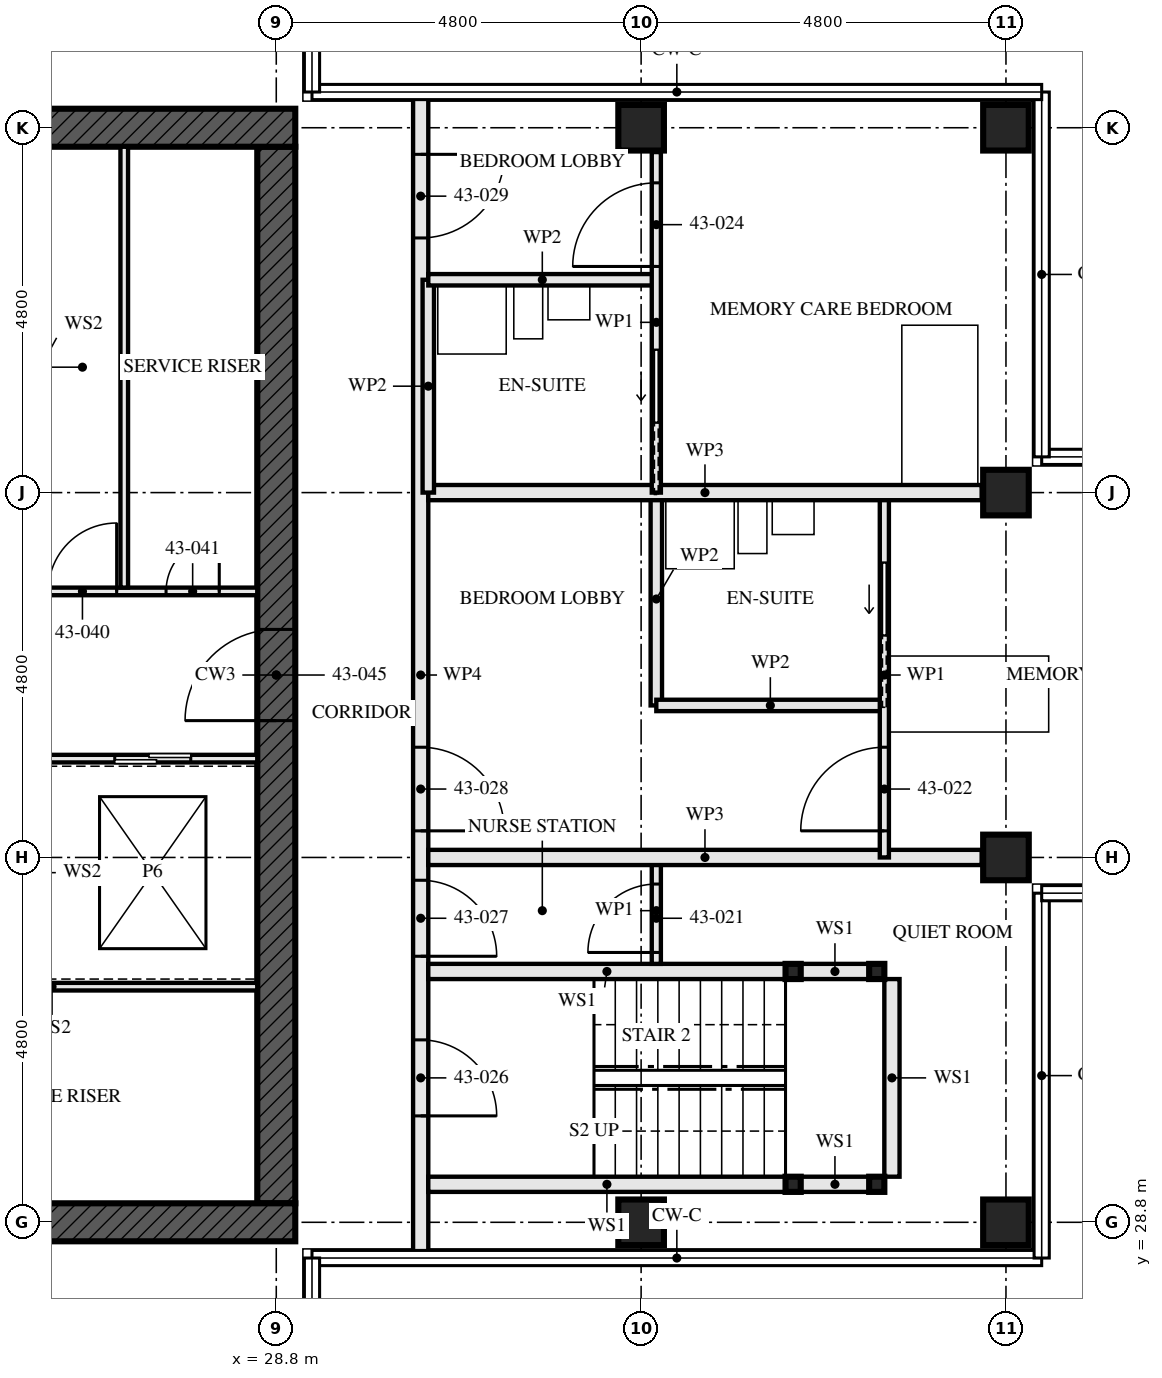
"""IFC4 building model, lengths in metres.
Left out: names, types, materials, properties, quantities, classifications, styles, units other than length and angle.
Written with IfcOpenShell. Run it as: python <this file> out.ifc"""

import sys

from ifc_helpers import new_model, si_unit, direction, frame, frame_2d, origin, origin_2d, place, context, subcontext, project, spatial, rectangle, hollow_rectangle, extrude, element, fill, save


model = new_model("IFC4")
c1 = context("Model", 3, precision=1e-05, world=origin(), true_north=direction((0.0, 1.0)))
c2 = subcontext(c1, "Body", "Model", "MODEL_VIEW")
j1 = project(units=[si_unit("LENGTHUNIT", "METRE"), si_unit("PLANEANGLEUNIT", "RADIAN")], contexts=[c1])
p1 = place(None, origin())
s1 = spatial("IfcSite", under=j1, at=p1, CompositionType="ELEMENT")
p2 = place(p1, origin())
s2 = spatial("IfcBuilding", under=s1, at=p2, CompositionType="ELEMENT")
p3 = place(p2, frame((0.0, 0.0, 158.5)))
s3 = spatial("IfcBuildingStorey", under=s2, at=p3, CompositionType="ELEMENT", Elevation=158.5)
for number, where, z_axis, x_axis in (
    (1, (33.6, 28.8, 0.0), (0.0, 0.0, 1.0), (0.0, 1.0, 0.0)),
    (2, (33.6, 43.2, 0.0), (0.0, 0.0, 1.0), (0.0, 1.0, 0.0)),
):
    element("IfcColumn", number, at=place(p3, frame(where, z_axis=z_axis, x_axis=x_axis)), inside=s3, PredefinedType="COLUMN", context=c2, shape_type="SweptSolid", body=[
        extrude(hollow_rectangle(XDim=0.6, YDim=0.6, WallThickness=0.08, at=origin_2d()), origin(), (0.0, 0.0, 1.0), 3.5),
    ])
for number, where, z_axis, x_axis in (
    (3, (38.4, 28.8, 0.0), (0.0, 0.0, 1.0), (0.0, 1.0, 0.0)),
    (4, (38.4, 33.6, 0.0), (0.0, 0.0, 1.0), (0.0, 1.0, 0.0)),
    (5, (38.4, 38.4, 0.0), (0.0, 0.0, 1.0), (0.0, 1.0, 0.0)),
    (6, (38.4, 43.2, 0.0), (0.0, 0.0, 1.0), (0.0, 1.0, 0.0)),
):
    element("IfcColumn", number, at=place(p3, frame(where, z_axis=z_axis, x_axis=x_axis)), inside=s3, PredefinedType="COLUMN", context=c2, shape_type="SweptSolid", body=[
        extrude(hollow_rectangle(XDim=0.6, YDim=0.6, WallThickness=0.06, at=origin_2d()), origin(), (0.0, 0.0, 1.0), 3.5),
    ])
p4 = place(p3, frame((14.15, 28.8, -0.17), z_axis=(0.0, 0.0, 1.0), x_axis=(1.0, 0.0, 0.0)))
e7 = element("IfcWall", 7, at=p4, inside=s3, PredefinedType="SHEAR", context=c2, shape_type="SweptSolid", body=[
    extrude(rectangle(XDim=14.9, YDim=0.5, at=frame_2d((7.45, 0.0))), origin(), (0.0, 0.0, 1.0), 3.5),
])
p5 = place(p4, frame((6.85, 0.0, 0.17)))
e8 = element("IfcOpeningElement", 8, at=p5, cuts=e7, PredefinedType="OPENING", context=c2, shape_type="SweptSolid", body=[
    extrude(rectangle(XDim=1.2, YDim=2.1, at=frame_2d((0.6, 1.05))), frame((0.0, 0.26, 0.0), z_axis=(0.0, -1.0, 0.0), x_axis=(1.0, 0.0, 0.0)), (0.0, 0.0, 1.0), 0.521),
])
p6 = place(p3, frame((29.05, 43.2, -0.17), z_axis=(0.0, 0.0, 1.0), x_axis=(-1.0, 0.0, 0.0)))
e9 = element("IfcWall", 9, at=p6, inside=s3, PredefinedType="SHEAR", context=c2, shape_type="SweptSolid", body=[
    extrude(rectangle(XDim=14.9, YDim=0.5, at=frame_2d((7.45, 0.0))), origin(), (0.0, 0.0, 1.0), 3.5),
])
p7 = place(p6, frame((6.85, 0.0, 0.17)))
e10 = element("IfcOpeningElement", 10, at=p7, cuts=e9, PredefinedType="OPENING", context=c2, shape_type="SweptSolid", body=[
    extrude(rectangle(XDim=1.2, YDim=2.1, at=frame_2d((0.6, 1.05))), frame((0.0, 0.26, 0.0), z_axis=(0.0, -1.0, 0.0), x_axis=(1.0, 0.0, 0.0)), (0.0, 0.0, 1.0), 0.521),
])
p8 = place(p3, frame((28.8, 29.05, -0.17), z_axis=(0.0, 0.0, 1.0), x_axis=(0.0, 1.0, 0.0)))
e11 = element("IfcWall", 11, at=p8, inside=s3, PredefinedType="SHEAR", context=c2, shape_type="SweptSolid", body=[
    extrude(rectangle(XDim=13.9, YDim=0.5, at=frame_2d((6.95, 0.0))), origin(), (0.0, 0.0, 1.0), 3.5),
])
p9 = place(p8, frame((6.35, 0.0, 0.17)))
e12 = element("IfcOpeningElement", 12, at=p9, cuts=e11, PredefinedType="OPENING", context=c2, shape_type="SweptSolid", body=[
    extrude(rectangle(XDim=1.2, YDim=2.1, at=frame_2d((0.6, 1.05))), frame((0.0, 0.26, 0.0), z_axis=(0.0, -1.0, 0.0), x_axis=(1.0, 0.0, 0.0)), (0.0, 0.0, 1.0), 0.521),
])
for number, where, z_axis, x_axis in (
    (13, (36.7, 29.3, 0.0), (0.0, 0.0, 1.0), (1.0, 0.0, 0.0)),
    (14, (36.7, 32.1, 0.0), (0.0, 0.0, 1.0), (1.0, 0.0, 0.0)),
    (15, (35.6, 29.3, 0.0), (0.0, 0.0, 1.0), (1.0, 0.0, 0.0)),
    (16, (35.6, 32.1, 0.0), (0.0, 0.0, 1.0), (1.0, 0.0, 0.0)),
):
    element("IfcColumn", number, at=place(p3, frame(where, z_axis=z_axis, x_axis=x_axis)), inside=s3, PredefinedType="COLUMN", context=c2, shape_type="SweptSolid", body=[
        extrude(hollow_rectangle(XDim=0.2, YDim=0.2, WallThickness=0.008, at=origin_2d()), origin(), (0.0, 0.0, 1.0), 3.33),
    ])
p10 = place(p3, frame((36.6, 29.3, 0.0), z_axis=(0.0, 0.0, 1.0), x_axis=(-1.0, 0.0, 0.0)))
e17 = element("IfcWall", 17, at=p10, inside=s3, PredefinedType="SOLIDWALL", context=c2, shape_type="SweptSolid", body=[
    extrude(rectangle(XDim=0.9, YDim=0.2, at=frame_2d((0.45, 0.0))), origin(), (0.0, 0.0, 1.0), 2.99),
])
p11 = place(p3, frame((35.5, 29.3, 0.0), z_axis=(0.0, 0.0, 1.0), x_axis=(-1.0, 0.0, 0.0)))
e18 = element("IfcWall", 18, at=p11, inside=s3, PredefinedType="SOLIDWALL", context=c2, shape_type="SweptSolid", body=[
    extrude(rectangle(XDim=4.7, YDim=0.2, at=frame_2d((2.35, 0.0))), origin(), (0.0, 0.0, 1.0), 2.99),
])
p12 = place(p3, frame((36.6, 32.1, 0.0), z_axis=(0.0, 0.0, 1.0), x_axis=(-1.0, 0.0, 0.0)))
e19 = element("IfcWall", 19, at=p12, inside=s3, PredefinedType="SOLIDWALL", context=c2, shape_type="SweptSolid", body=[
    extrude(rectangle(XDim=0.9, YDim=0.2, at=frame_2d((0.45, 0.0))), origin(), (0.0, 0.0, 1.0), 2.99),
])
p13 = place(p3, frame((35.5, 32.1, 0.0), z_axis=(0.0, 0.0, 1.0), x_axis=(-1.0, 0.0, 0.0)))
e20 = element("IfcWall", 20, at=p13, inside=s3, PredefinedType="SOLIDWALL", context=c2, shape_type="SweptSolid", body=[
    extrude(rectangle(XDim=4.7, YDim=0.2, at=frame_2d((2.35, 0.0))), origin(), (0.0, 0.0, 1.0), 2.99),
])
p14 = place(p3, frame((36.9, 29.4, 0.0), z_axis=(0.0, 0.0, 1.0), x_axis=(0.0, 1.0, 0.0)))
e21 = element("IfcWall", 21, at=p14, inside=s3, PredefinedType="SOLIDWALL", context=c2, shape_type="SweptSolid", body=[
    extrude(rectangle(XDim=2.6, YDim=0.2, at=frame_2d((1.3, 0.0))), origin(), (0.0, 0.0, 1.0), 3.33),
])
p15 = place(p3, frame((33.8, 32.2, 0.0), z_axis=(0.0, 0.0, 1.0), x_axis=(0.0, 1.0, 0.0)))
e22 = element("IfcWall", 22, at=p15, inside=s3, PredefinedType="PARTITIONING", context=c2, shape_type="SweptSolid", body=[
    extrude(rectangle(XDim=1.4, YDim=0.12, at=frame_2d((0.7, 0.0))), origin(), (0.0, 0.0, 1.0), 3.33),
])
p16 = place(p15, frame((0.15, 0.0, 0.0)))
e23 = element("IfcOpeningElement", 23, at=p16, cuts=e22, PredefinedType="OPENING", context=c2, shape_type="SweptSolid", body=[
    extrude(rectangle(XDim=0.9, YDim=2.1, at=frame_2d((0.45, 1.05))), frame((0.0, 0.071, 0.0), z_axis=(0.0, -1.0, 0.0), x_axis=(1.0, 0.0, 0.0)), (0.0, 0.0, 1.0), 0.141),
])
p17 = place(p3, frame((38.08, 33.6, 0.0), z_axis=(0.0, 0.0, 1.0), x_axis=(-1.0, 0.0, 0.0)))
e24 = element("IfcWall", 24, at=p17, inside=s3, PredefinedType="PARTITIONING", context=c2, shape_type="SweptSolid", body=[
    extrude(rectangle(XDim=7.28, YDim=0.2, at=frame_2d((3.64, 0.0))), origin(), (0.0, 0.0, 1.0), 2.55),
])
p18 = place(p3, frame((36.8, 35.6, 0.0), z_axis=(0.0, 0.0, 1.0), x_axis=(-1.0, 0.0, 0.0)))
e25 = element("IfcWall", 25, at=p18, inside=s3, PredefinedType="PARTITIONING", context=c2, shape_type="SweptSolid", body=[
    extrude(rectangle(XDim=3.0, YDim=0.15, at=frame_2d((1.5, 0.0))), origin(), (0.0, 0.0, 1.0), 3.33),
])
p19 = place(p3, frame((33.8, 35.6, 0.0), z_axis=(0.0, 0.0, 1.0), x_axis=(0.0, 1.0, 0.0)))
e26 = element("IfcWall", 26, at=p19, inside=s3, PredefinedType="PARTITIONING", context=c2, shape_type="SweptSolid", body=[
    extrude(rectangle(XDim=2.8, YDim=0.15, at=frame_2d((1.4, 0.0))), origin(), (0.0, 0.0, 1.0), 3.33),
])
p20 = place(p3, frame((36.8, 33.6, 0.0), z_axis=(0.0, 0.0, 1.0), x_axis=(0.0, 1.0, 0.0)))
e27 = element("IfcWall", 27, at=p20, inside=s3, PredefinedType="PARTITIONING", context=c2, shape_type="SweptSolid", body=[
    extrude(rectangle(XDim=4.8, YDim=0.12, at=frame_2d((2.4, 0.0))), origin(), (0.0, 0.0, 1.0), 3.33),
])
p21 = place(p20, frame((0.35, 0.0, 0.0)))
e28 = element("IfcOpeningElement", 28, at=p21, cuts=e27, PredefinedType="OPENING", context=c2, shape_type="SweptSolid", body=[
    extrude(rectangle(XDim=1.1, YDim=2.1, at=frame_2d((0.55, 1.05))), frame((0.0, 0.071, 0.0), z_axis=(0.0, -1.0, 0.0), x_axis=(1.0, 0.0, 0.0)), (0.0, 0.0, 1.0), 0.141),
])
p22 = place(p20, frame((2.925, 0.0, 0.0)))
e29 = element("IfcOpeningElement", 29, at=p22, cuts=e27, PredefinedType="OPENING", context=c2, shape_type="SweptSolid", body=[
    extrude(rectangle(XDim=0.95, YDim=2.1, at=frame_2d((0.475, 1.05))), frame((0.0, 0.071, 0.0), z_axis=(0.0, -1.0, 0.0), x_axis=(1.0, 0.0, 0.0)), (0.0, 0.0, 1.0), 0.141),
])
p23 = place(p3, frame((38.08, 38.4, 0.0), z_axis=(0.0, 0.0, 1.0), x_axis=(-1.0, 0.0, 0.0)))
e30 = element("IfcWall", 30, at=p23, inside=s3, PredefinedType="PARTITIONING", context=c2, shape_type="SweptSolid", body=[
    extrude(rectangle(XDim=7.28, YDim=0.2, at=frame_2d((3.64, 0.0))), origin(), (0.0, 0.0, 1.0), 2.55),
])
p24 = place(p3, frame((33.8, 41.2, 0.0), z_axis=(0.0, 0.0, 1.0), x_axis=(-1.0, 0.0, 0.0)))
e31 = element("IfcWall", 31, at=p24, inside=s3, PredefinedType="PARTITIONING", context=c2, shape_type="SweptSolid", body=[
    extrude(rectangle(XDim=3.0, YDim=0.15, at=frame_2d((1.5, 0.0))), origin(), (0.0, 0.0, 1.0), 3.33),
])
p25 = place(p3, frame((30.8, 38.4, 0.0), z_axis=(0.0, 0.0, 1.0), x_axis=(0.0, 1.0, 0.0)))
e32 = element("IfcWall", 32, at=p25, inside=s3, PredefinedType="PARTITIONING", context=c2, shape_type="SweptSolid", body=[
    extrude(rectangle(XDim=2.8, YDim=0.15, at=frame_2d((1.4, 0.0))), origin(), (0.0, 0.0, 1.0), 3.33),
])
p26 = place(p3, frame((33.8, 38.4, 0.0), z_axis=(0.0, 0.0, 1.0), x_axis=(0.0, 1.0, 0.0)))
e33 = element("IfcWall", 33, at=p26, inside=s3, PredefinedType="PARTITIONING", context=c2, shape_type="SweptSolid", body=[
    extrude(rectangle(XDim=4.48, YDim=0.12, at=frame_2d((2.24, 0.0))), origin(), (0.0, 0.0, 1.0), 3.33),
])
p27 = place(p26, frame((2.975, 0.0, 0.0)))
e34 = element("IfcOpeningElement", 34, at=p27, cuts=e33, PredefinedType="OPENING", context=c2, shape_type="SweptSolid", body=[
    extrude(rectangle(XDim=1.1, YDim=2.1, at=frame_2d((0.55, 1.05))), frame((0.0, 0.071, 0.0), z_axis=(0.0, -1.0, 0.0), x_axis=(1.0, 0.0, 0.0)), (0.0, 0.0, 1.0), 0.141),
])
p28 = place(p26, frame((0.925, 0.0, 0.0)))
e35 = element("IfcOpeningElement", 35, at=p28, cuts=e33, PredefinedType="OPENING", context=c2, shape_type="SweptSolid", body=[
    extrude(rectangle(XDim=0.95, YDim=2.1, at=frame_2d((0.475, 1.05))), frame((0.0, 0.071, 0.0), z_axis=(0.0, -1.0, 0.0), x_axis=(1.0, 0.0, 0.0)), (0.0, 0.0, 1.0), 0.141),
])
p29 = place(p3, frame((30.7, 28.35, 0.0), z_axis=(0.0, 0.0, 1.0), x_axis=(0.0, 1.0, 0.0)))
e36 = element("IfcWall", 36, at=p29, inside=s3, PredefinedType="PARTITIONING", context=c2, shape_type="SweptSolid", body=[
    extrude(rectangle(XDim=15.3, YDim=0.2, at=frame_2d((7.65, 0.0))), origin(), (0.0, 0.0, 1.0), 2.32),
])
p30 = place(p29, frame((1.85, 0.0, 0.0)))
e37 = element("IfcOpeningElement", 37, at=p30, cuts=e36, PredefinedType="OPENING", context=c2, shape_type="SweptSolid", body=[
    extrude(rectangle(XDim=1.0, YDim=2.1, at=frame_2d((0.5, 1.05))), frame((0.0, 0.111, 0.0), z_axis=(0.0, -1.0, 0.0), x_axis=(1.0, 0.0, 0.0)), (0.0, 0.0, 1.0), 0.221),
])
p31 = place(p29, frame((3.95, 0.0, 0.0)))
e38 = element("IfcOpeningElement", 38, at=p31, cuts=e36, PredefinedType="OPENING", context=c2, shape_type="SweptSolid", body=[
    extrude(rectangle(XDim=1.0, YDim=2.1, at=frame_2d((0.5, 1.05))), frame((0.0, 0.111, 0.0), z_axis=(0.0, -1.0, 0.0), x_axis=(1.0, 0.0, 0.0)), (0.0, 0.0, 1.0), 0.221),
])
p32 = place(p29, frame((5.6, 0.0, 0.0)))
e39 = element("IfcOpeningElement", 39, at=p32, cuts=e36, PredefinedType="OPENING", context=c2, shape_type="SweptSolid", body=[
    extrude(rectangle(XDim=1.1, YDim=2.1, at=frame_2d((0.55, 1.05))), frame((0.0, 0.111, 0.0), z_axis=(0.0, -1.0, 0.0), x_axis=(1.0, 0.0, 0.0)), (0.0, 0.0, 1.0), 0.221),
])
p33 = place(p29, frame((13.4, 0.0, 0.0)))
e40 = element("IfcOpeningElement", 40, at=p33, cuts=e36, PredefinedType="OPENING", context=c2, shape_type="SweptSolid", body=[
    extrude(rectangle(XDim=1.1, YDim=2.1, at=frame_2d((0.55, 1.05))), frame((0.0, 0.111, 0.0), z_axis=(0.0, -1.0, 0.0), x_axis=(1.0, 0.0, 0.0)), (0.0, 0.0, 1.0), 0.221),
])
p34 = place(p3, frame((26.8, 37.15, 0.0), z_axis=(0.0, 0.0, 1.0), x_axis=(0.0, 1.0, 0.0)))
e41 = element("IfcWall", 41, at=p34, inside=s3, PredefinedType="SOLIDWALL", context=c2, shape_type="SweptSolid", body=[
    extrude(rectangle(XDim=5.8, YDim=0.1, at=frame_2d((2.9, 0.0))), origin(), (0.0, 0.0, 1.0), 3.33),
])
p35 = place(p3, frame((23.05, 34.9, 0.0), z_axis=(0.0, 0.0, 1.0), x_axis=(1.0, 0.0, 0.0)))
e42 = element("IfcWall", 42, at=p35, inside=s3, PredefinedType="SOLIDWALL", context=c2, shape_type="SweptSolid", body=[
    extrude(rectangle(XDim=5.5, YDim=0.1, at=frame_2d((2.75, 0.0))), origin(), (0.0, 0.0, 1.0), 3.33),
])
p36 = place(p35, frame((0.85, 0.0, 0.0)))
e43 = element("IfcOpeningElement", 43, at=p36, cuts=e42, PredefinedType="OPENING", context=c2, shape_type="SweptSolid", body=[
    extrude(rectangle(XDim=1.0, YDim=2.1, at=frame_2d((0.5, 1.05))), frame((0.0, 0.061, 0.0), z_axis=(0.0, -1.0, 0.0), x_axis=(1.0, 0.0, 0.0)), (0.0, 0.0, 1.0), 0.121),
])
p37 = place(p35, frame((3.625, 0.0, 0.0)))
e44 = element("IfcOpeningElement", 44, at=p37, cuts=e42, PredefinedType="OPENING", context=c2, shape_type="SweptSolid", body=[
    extrude(rectangle(XDim=1.0, YDim=2.1, at=frame_2d((0.5, 1.05))), frame((0.0, 0.061, 0.0), z_axis=(0.0, -1.0, 0.0), x_axis=(1.0, 0.0, 0.0)), (0.0, 0.0, 1.0), 0.121),
])
p38 = place(p3, frame((22.65, 37.1, 0.0), z_axis=(0.0, 0.0, 1.0), x_axis=(1.0, 0.0, 0.0)))
e45 = element("IfcWall", 45, at=p38, inside=s3, PredefinedType="SOLIDWALL", context=c2, shape_type="SweptSolid", body=[
    extrude(rectangle(XDim=5.9, YDim=0.1, at=frame_2d((2.95, 0.0))), origin(), (0.0, 0.0, 1.0), 3.33),
])
p39 = place(p38, frame((3.15, 0.0, 0.0)))
e46 = element("IfcOpeningElement", 46, at=p39, cuts=e45, PredefinedType="OPENING", context=c2, shape_type="SweptSolid", body=[
    extrude(rectangle(XDim=0.9, YDim=2.1, at=frame_2d((0.45, 1.05))), frame((0.0, 0.061, 0.0), z_axis=(0.0, -1.0, 0.0), x_axis=(1.0, 0.0, 0.0)), (0.0, 0.0, 1.0), 0.121),
])
p40 = place(p38, frame((4.7, 0.0, 0.0)))
e47 = element("IfcOpeningElement", 47, at=p40, cuts=e45, PredefinedType="OPENING", context=c2, shape_type="SweptSolid", body=[
    extrude(rectangle(XDim=0.7, YDim=2.1, at=frame_2d((0.35, 1.05))), frame((0.0, 0.061, 0.0), z_axis=(0.0, -1.0, 0.0), x_axis=(1.0, 0.0, 0.0)), (0.0, 0.0, 1.0), 0.121),
])
p41 = place(p3, frame((23.15, 31.9, 0.0), z_axis=(0.0, 0.0, 1.0), x_axis=(1.0, 0.0, 0.0)))
e48 = element("IfcWall", 48, at=p41, inside=s3, PredefinedType="SOLIDWALL", context=c2, shape_type="SweptSolid", body=[
    extrude(rectangle(XDim=5.4, YDim=0.1, at=frame_2d((2.7, 0.0))), origin(), (0.0, 0.0, 1.0), 3.33),
])
p42 = place(p16, origin())
e49 = element("IfcDoor", 49, at=p42, inside=s3, OperationType="SINGLE_SWING_RIGHT", PredefinedType="DOOR", context=c2, shape_type="SweptSolid", body=[
    extrude(rectangle(XDim=0.9, YDim=2.1, at=frame_2d((0.45, 1.05))), frame((0.0, 0.022, 0.0), z_axis=(0.0, -1.0, 0.0), x_axis=(1.0, 0.0, 0.0)), (0.0, 0.0, 1.0), 0.044),
])
fill(e23, e49)
p43 = place(p21, origin())
e50 = element("IfcDoor", 50, at=p43, inside=s3, OperationType="SINGLE_SWING_RIGHT", PredefinedType="DOOR", context=c2, shape_type="SweptSolid", body=[
    extrude(rectangle(XDim=1.1, YDim=2.1, at=frame_2d((0.55, 1.05))), frame((0.0, 0.022, 0.0), z_axis=(0.0, -1.0, 0.0), x_axis=(1.0, 0.0, 0.0)), (0.0, 0.0, 1.0), 0.044),
])
fill(e28, e50)
p44 = place(p22, origin())
e51 = element("IfcDoor", 51, at=p44, inside=s3, OperationType="SLIDING_TO_RIGHT", PredefinedType="DOOR", context=c2, shape_type="SweptSolid", body=[
    extrude(rectangle(XDim=0.95, YDim=2.1, at=frame_2d((0.475, 1.05))), frame((0.0, 0.022, 0.0), z_axis=(0.0, -1.0, 0.0), x_axis=(1.0, 0.0, 0.0)), (0.0, 0.0, 1.0), 0.044),
])
fill(e29, e51)
p45 = place(p27, origin())
e52 = element("IfcDoor", 52, at=p45, inside=s3, OperationType="SINGLE_SWING_RIGHT", PredefinedType="DOOR", context=c2, shape_type="SweptSolid", body=[
    extrude(rectangle(XDim=1.1, YDim=2.1, at=frame_2d((0.55, 1.05))), frame((0.0, 0.022, 0.0), z_axis=(0.0, -1.0, 0.0), x_axis=(1.0, 0.0, 0.0)), (0.0, 0.0, 1.0), 0.044),
])
fill(e34, e52)
p46 = place(p28, origin())
e53 = element("IfcDoor", 53, at=p46, inside=s3, OperationType="SLIDING_TO_RIGHT", PredefinedType="DOOR", context=c2, shape_type="SweptSolid", body=[
    extrude(rectangle(XDim=0.95, YDim=2.1, at=frame_2d((0.475, 1.05))), frame((0.0, 0.022, 0.0), z_axis=(0.0, -1.0, 0.0), x_axis=(1.0, 0.0, 0.0)), (0.0, 0.0, 1.0), 0.044),
])
fill(e35, e53)
p47 = place(p30, frame((1.0, 0.0, 0.0), z_axis=(0.0, 0.0, 1.0), x_axis=(-1.0, 0.0, 0.0)))
e54 = element("IfcDoor", 54, at=p47, inside=s3, OperationType="SINGLE_SWING_LEFT", PredefinedType="DOOR", context=c2, shape_type="SweptSolid", body=[
    extrude(rectangle(XDim=1.0, YDim=2.1, at=frame_2d((0.5, 1.05))), frame((0.0, 0.032, 0.0), z_axis=(0.0, -1.0, 0.0), x_axis=(1.0, 0.0, 0.0)), (0.0, 0.0, 1.0), 0.064),
])
fill(e37, e54)
p48 = place(p31, frame((1.0, 0.0, 0.0), z_axis=(0.0, 0.0, 1.0), x_axis=(-1.0, 0.0, 0.0)))
e55 = element("IfcDoor", 55, at=p48, inside=s3, OperationType="SINGLE_SWING_LEFT", PredefinedType="DOOR", context=c2, shape_type="SweptSolid", body=[
    extrude(rectangle(XDim=1.0, YDim=2.1, at=frame_2d((0.5, 1.05))), frame((0.0, 0.027, 0.0), z_axis=(0.0, -1.0, 0.0), x_axis=(1.0, 0.0, 0.0)), (0.0, 0.0, 1.0), 0.054),
])
fill(e38, e55)
p49 = place(p32, frame((1.1, 0.0, 0.0), z_axis=(0.0, 0.0, 1.0), x_axis=(-1.0, 0.0, 0.0)))
e56 = element("IfcDoor", 56, at=p49, inside=s3, OperationType="SINGLE_SWING_LEFT", PredefinedType="DOOR", context=c2, shape_type="SweptSolid", body=[
    extrude(rectangle(XDim=1.1, YDim=2.1, at=frame_2d((0.55, 1.05))), frame((0.0, 0.027, 0.0), z_axis=(0.0, -1.0, 0.0), x_axis=(1.0, 0.0, 0.0)), (0.0, 0.0, 1.0), 0.054),
])
fill(e39, e56)
p50 = place(p33, frame((1.1, 0.0, 0.0), z_axis=(0.0, 0.0, 1.0), x_axis=(-1.0, 0.0, 0.0)))
e57 = element("IfcDoor", 57, at=p50, inside=s3, OperationType="SINGLE_SWING_RIGHT", PredefinedType="DOOR", context=c2, shape_type="SweptSolid", body=[
    extrude(rectangle(XDim=1.1, YDim=2.1, at=frame_2d((0.55, 1.05))), frame((0.0, 0.027, 0.0), z_axis=(0.0, -1.0, 0.0), x_axis=(1.0, 0.0, 0.0)), (0.0, 0.0, 1.0), 0.054),
])
fill(e40, e57)
p51 = place(p37, origin())
e58 = element("IfcDoor", 58, at=p51, inside=s3, OperationType="SLIDING_TO_LEFT", PredefinedType="DOOR", context=c2, shape_type="SweptSolid", body=[
    extrude(rectangle(XDim=1.0, YDim=2.1, at=frame_2d((0.5, 1.05))), frame((0.0, 0.05, 0.0), z_axis=(0.0, -1.0, 0.0), x_axis=(1.0, 0.0, 0.0)), (0.0, 0.0, 1.0), 0.1),
])
fill(e44, e58)
p52 = place(p39, origin())
e59 = element("IfcDoor", 59, at=p52, inside=s3, OperationType="SINGLE_SWING_LEFT", PredefinedType="DOOR", context=c2, shape_type="SweptSolid", body=[
    extrude(rectangle(XDim=0.9, YDim=2.1, at=frame_2d((0.45, 1.05))), frame((0.0, 0.027, 0.0), z_axis=(0.0, -1.0, 0.0), x_axis=(1.0, 0.0, 0.0)), (0.0, 0.0, 1.0), 0.054),
])
fill(e46, e59)
p53 = place(p40, origin())
e60 = element("IfcDoor", 60, at=p53, inside=s3, OperationType="SINGLE_SWING_LEFT", PredefinedType="DOOR", context=c2, shape_type="SweptSolid", body=[
    extrude(rectangle(XDim=0.7, YDim=2.1, at=frame_2d((0.35, 1.05))), frame((0.0, 0.027, 0.0), z_axis=(0.0, -1.0, 0.0), x_axis=(1.0, 0.0, 0.0)), (0.0, 0.0, 1.0), 0.054),
])
fill(e47, e60)
p54 = place(p9, origin())
e61 = element("IfcDoor", 61, at=p54, inside=s3, OperationType="SINGLE_SWING_LEFT", PredefinedType="DOOR", context=c2, shape_type="SweptSolid", body=[
    extrude(rectangle(XDim=1.2, YDim=2.1, at=frame_2d((0.6, 1.05))), frame((0.0, 0.027, 0.0), z_axis=(0.0, -1.0, 0.0), x_axis=(1.0, 0.0, 0.0)), (0.0, 0.0, 1.0), 0.054),
])
fill(e12, e61)
save(model, sys.argv[1])
